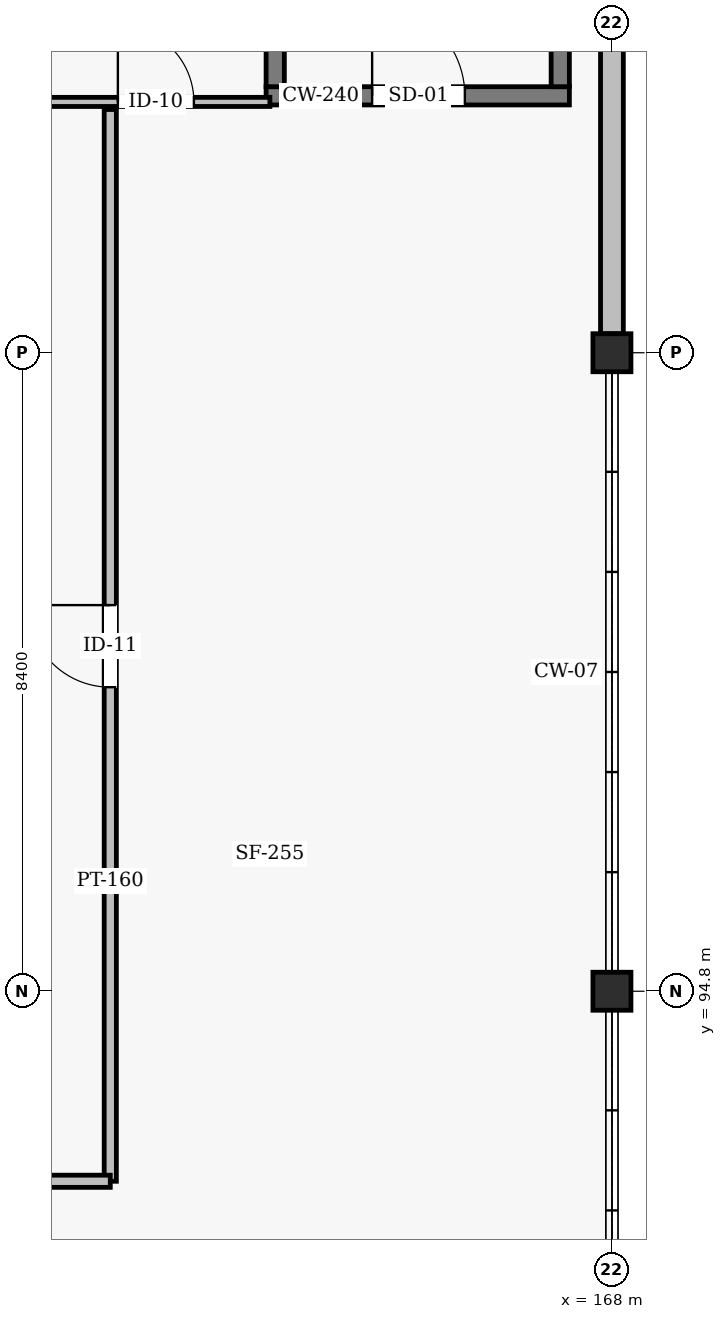
"""IFC4 building model, lengths in metres.
Left out: names, types, materials, properties, quantities, classifications, styles, units other than length and angle.
Written with IfcOpenShell. Run it as: python <this file> out.ifc"""

import sys

from ifc_helpers import new_model, si_unit, direction, frame, frame_2d, origin, origin_2d, place, context, subcontext, project, spatial, rectangle, hollow_rectangle, extrude, element, fill, save


model = new_model("IFC4")
c1 = context("Model", 3, precision=1e-05, world=origin(), true_north=direction((0.0, 1.0)))
c2 = subcontext(c1, "Body", "Model", "MODEL_VIEW")
j1 = project(units=[si_unit("LENGTHUNIT", "METRE"), si_unit("PLANEANGLEUNIT", "RADIAN")], contexts=[c1])
p1 = place(None, origin())
s1 = spatial("IfcSite", under=j1, at=p1, CompositionType="ELEMENT")
p2 = place(p1, origin())
s2 = spatial("IfcBuilding", under=s1, at=p2, CompositionType="ELEMENT")
p3 = place(p2, frame((0.0, 0.0, 28.2)))
s3 = spatial("IfcBuildingStorey", under=s2, at=p3, CompositionType="ELEMENT", Elevation=28.2)
for number, where, z_axis, x_axis in (
    (1, (168.0, 94.8, 0.0), (0.0, 0.0, 1.0), (1.0, 0.0, 0.0)),
    (2, (168.0, 103.2, 0.0), (0.0, 0.0, 1.0), (1.0, 0.0, 0.0)),
):
    element("IfcColumn", number, at=place(p3, frame(where, z_axis=z_axis, x_axis=x_axis)), inside=s3, PredefinedType="COLUMN", context=c2, shape_type="SweptSolid", body=[
        extrude(hollow_rectangle(XDim=0.5, YDim=0.5, WallThickness=0.02, InnerFilletRadius=0.02, OuterFilletRadius=0.04, at=origin_2d()), origin(), (0.0, 0.0, 1.0), 3.6),
    ])
p4 = place(p3, frame((168.0, 103.45, 0.0), z_axis=(0.0, 0.0, 1.0), x_axis=(0.0, 1.0, 0.0)))
e3 = element("IfcWall", 3, at=p4, inside=s3, PredefinedType="SOLIDWALL", context=c2, shape_type="SweptSolid", body=[
    extrude(rectangle(XDim=11.5, YDim=0.3, at=frame_2d((5.75, 0.0))), origin(), (0.0, 0.0, 1.0), 2.56),
])
p5 = place(p3, frame((163.45, 106.58, 0.0), z_axis=(0.0, 0.0, 1.0), x_axis=(1.0, 0.0, 0.0)))
e4 = element("IfcWall", 4, at=p5, inside=s3, PredefinedType="SHEAR", context=c2, shape_type="SweptSolid", body=[
    extrude(rectangle(XDim=3.99, YDim=0.24, at=frame_2d((1.995, 0.0))), origin(), (0.0, 0.0, 1.0), 3.352),
])
p6 = place(p5, frame((1.395, 0.0, 0.0)))
e5 = element("IfcOpeningElement", 5, at=p6, cuts=e4, PredefinedType="OPENING", context=c2, shape_type="SweptSolid", body=[
    extrude(rectangle(XDim=1.22, YDim=2.18, at=frame_2d((0.61, 1.09))), frame((0.0, 0.13, 0.0), z_axis=(0.0, -1.0, 0.0), x_axis=(1.0, 0.0, 0.0)), (0.0, 0.0, 1.0), 0.26),
])
for number, where, z_axis, x_axis in (
    (6, (163.57, 106.7, 0.0), (0.0, 0.0, 1.0), (0.0, 1.0, 0.0)),
    (7, (167.32, 106.7, 0.0), (0.0, 0.0, 1.0), (0.0, 1.0, 0.0)),
):
    element("IfcWall", number, at=place(p3, frame(where, z_axis=z_axis, x_axis=x_axis)), inside=s3, PredefinedType="SHEAR", context=c2, shape_type="SweptSolid", body=[
        extrude(rectangle(XDim=7.9, YDim=0.24, at=frame_2d((3.95, 0.0))), origin(), (0.0, 0.0, 1.0), 3.352),
    ])
p7 = place(p3, frame((160.5, 106.5, 0.0), z_axis=(0.0, 0.0, 1.0), x_axis=(1.0, 0.0, 0.0)))
e8 = element("IfcWall", 8, at=p7, inside=s3, PredefinedType="PARTITIONING", context=c2, shape_type="SweptSolid", body=[
    extrude(rectangle(XDim=3.0, YDim=0.12, at=frame_2d((1.5, 0.0))), origin(), (0.0, 0.0, 1.0), 3.352),
])
p8 = place(p7, frame((1.0, 0.0, 0.0)))
e9 = element("IfcOpeningElement", 9, at=p8, cuts=e8, PredefinedType="OPENING", context=c2, shape_type="SweptSolid", body=[
    extrude(rectangle(XDim=1.0, YDim=2.1, at=frame_2d((0.5, 1.05))), frame((0.0, 0.07, 0.0), z_axis=(0.0, -1.0, 0.0), x_axis=(1.0, 0.0, 0.0)), (0.0, 0.0, 1.0), 0.14),
])
p9 = place(p3, frame((161.4, 92.3, 0.0), z_axis=(0.0, 0.0, 1.0), x_axis=(0.0, 1.0, 0.0)))
e10 = element("IfcWall", 10, at=p9, inside=s3, PredefinedType="PARTITIONING", context=c2, shape_type="SweptSolid", body=[
    extrude(rectangle(XDim=14.1, YDim=0.16, at=frame_2d((7.05, 0.0))), origin(), (0.0, 0.0, 1.0), 2.752),
])
p10 = place(p9, frame((6.5, 0.0, 0.0)))
e11 = element("IfcOpeningElement", 11, at=p10, cuts=e10, PredefinedType="OPENING", context=c2, shape_type="SweptSolid", body=[
    extrude(rectangle(XDim=1.08, YDim=2.08, at=frame_2d((0.54, 1.04))), frame((0.0, 0.09, 0.0), z_axis=(0.0, -1.0, 0.0), x_axis=(1.0, 0.0, 0.0)), (0.0, 0.0, 1.0), 0.18),
])
p11 = place(p3, frame((157.8, 92.3, 0.0), z_axis=(0.0, 0.0, 1.0), x_axis=(1.0, 0.0, 0.0)))
e12 = element("IfcWall", 12, at=p11, inside=s3, PredefinedType="PARTITIONING", context=c2, shape_type="SweptSolid", body=[
    extrude(rectangle(XDim=3.6, YDim=0.16, at=frame_2d((1.8, 0.0))), origin(), (0.0, 0.0, 1.0), 2.852),
])
p12 = place(p11, frame((1.25, 0.0, 0.0)))
e13 = element("IfcOpeningElement", 13, at=p12, cuts=e12, PredefinedType="OPENING", context=c2, shape_type="SweptSolid", body=[
    extrude(rectangle(XDim=1.08, YDim=2.08, at=frame_2d((0.54, 1.04))), frame((0.0, 0.09, 0.0), z_axis=(0.0, -1.0, 0.0), x_axis=(1.0, 0.0, 0.0)), (0.0, 0.0, 1.0), 0.18),
])
p13 = place(p6, origin())
e14 = element("IfcDoor", 14, at=p13, inside=s3, OperationType="SINGLE_SWING_LEFT", PredefinedType="DOOR", context=c2, shape_type="SweptSolid", body=[
    extrude(rectangle(XDim=1.22, YDim=2.18, at=frame_2d((0.61, 1.09))), frame((0.0, 0.025, 0.0), z_axis=(0.0, -1.0, 0.0), x_axis=(1.0, 0.0, 0.0)), (0.0, 0.0, 1.0), 0.05),
])
fill(e5, e14)
p14 = place(p8, origin())
e15 = element("IfcDoor", 15, at=p14, inside=s3, OperationType="SINGLE_SWING_LEFT", PredefinedType="DOOR", context=c2, shape_type="SweptSolid", body=[
    extrude(rectangle(XDim=1.0, YDim=2.1, at=frame_2d((0.5, 1.05))), frame((0.0, 0.025, 0.0), z_axis=(0.0, -1.0, 0.0), x_axis=(1.0, 0.0, 0.0)), (0.0, 0.0, 1.0), 0.05),
])
fill(e9, e15)
p15 = place(p10, origin())
e16 = element("IfcDoor", 16, at=p15, inside=s3, OperationType="SINGLE_SWING_RIGHT", PredefinedType="DOOR", context=c2, shape_type="SweptSolid", body=[
    extrude(rectangle(XDim=1.08, YDim=2.08, at=frame_2d((0.54, 1.04))), frame((0.0, 0.025, 0.0), z_axis=(0.0, -1.0, 0.0), x_axis=(1.0, 0.0, 0.0)), (0.0, 0.0, 1.0), 0.05),
])
fill(e11, e16)
save(model, sys.argv[1])
